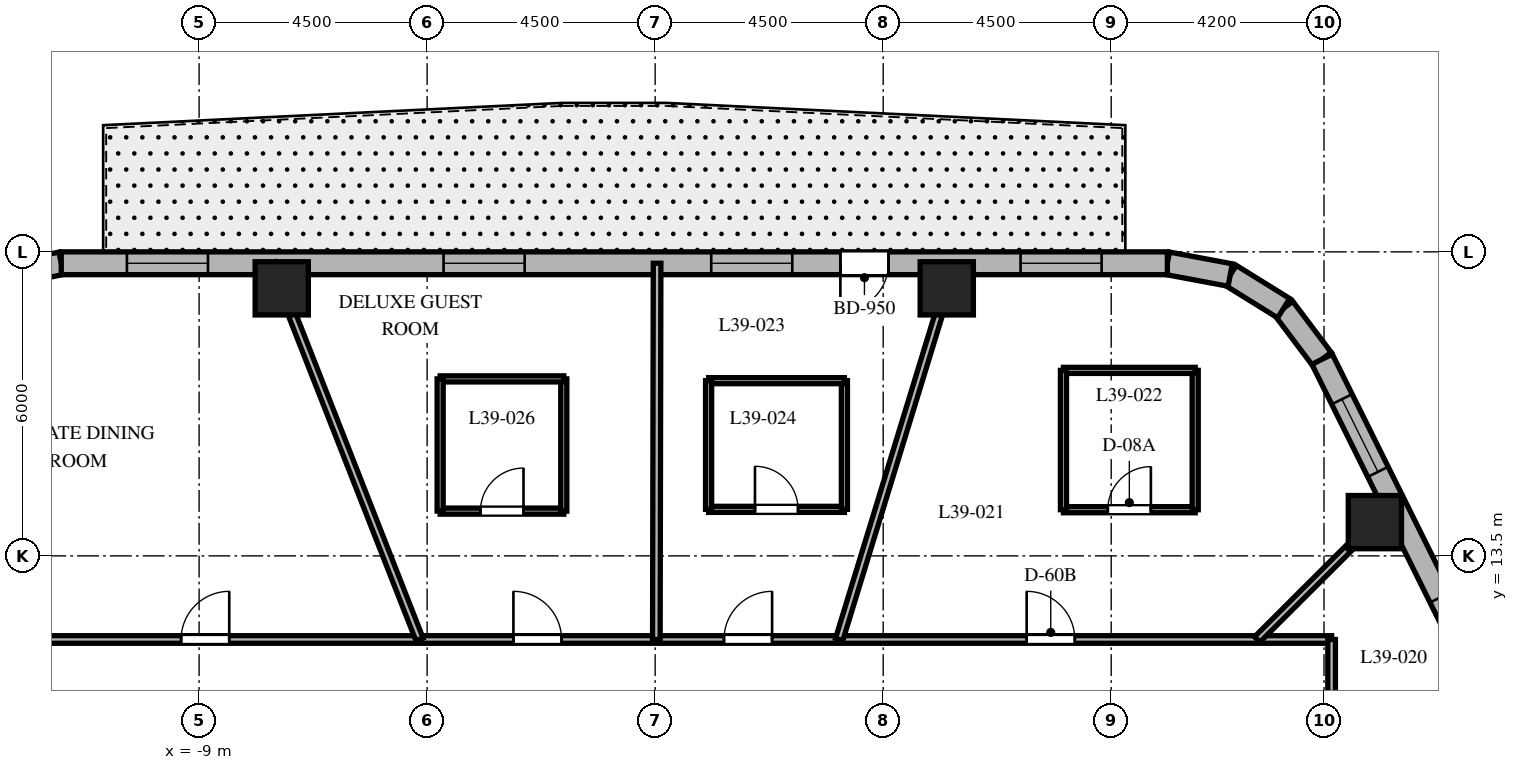
"""IFC4 building model, lengths in metres.
Left out: names, types, materials, properties, quantities, classifications, styles, units other than length and angle.
Written with IfcOpenShell. Run it as: python <this file> out.ifc"""

import sys

from ifc_helpers import new_model, si_unit, direction, frame, frame_2d, origin, origin_2d, place, context, subcontext, project, spatial, rectangle, extrude, element, fill, save


model = new_model("IFC4")
c1 = context("Model", 3, precision=1e-05, world=origin(), true_north=direction((0.0, 1.0)))
c2 = subcontext(c1, "Body", "Model", "MODEL_VIEW")
j1 = project(units=[si_unit("LENGTHUNIT", "METRE"), si_unit("PLANEANGLEUNIT", "RADIAN")], contexts=[c1])
p1 = place(None, origin())
s1 = spatial("IfcSite", under=j1, at=p1, CompositionType="ELEMENT")
p2 = place(p1, origin())
s2 = spatial("IfcBuilding", under=s1, at=p2, CompositionType="ELEMENT")
p3 = place(p2, frame((0.0, 0.0, 159.1)))
s3 = spatial("IfcBuildingStorey", under=s2, at=p3, CompositionType="ELEMENT", Elevation=159.1)
for number, where, z_axis, x_axis in (
    (1, (14.204, 14.166, 0.0), (0.0, 0.0, 1.0), (1.0, 0.0, 0.0)),
    (2, (5.755, 18.78, 0.0), (0.0, 0.0, 1.0), (1.0, 0.0, 0.0)),
    (3, (-7.369, 18.78, 0.0), (0.0, 0.0, 1.0), (1.0, 0.0, 0.0)),
):
    element("IfcColumn", number, at=place(p3, frame(where, z_axis=z_axis, x_axis=x_axis)), inside=s3, PredefinedType="COLUMN", context=c2, shape_type="SweptSolid", body=[
        extrude(rectangle(XDim=1.05, YDim=1.05, at=origin_2d()), origin(), (0.0, 0.0, 1.0), 3.7),
    ])
p4 = place(p3, frame((13.162, 17.381, 0.0), z_axis=(0.0, 0.0, 1.0), x_axis=(-0.601515770517, 0.798860925205, 0.0)))
e4 = element("IfcWall", 4, at=p4, inside=s3, PredefinedType="SOLIDWALL", context=c2, shape_type="SweptSolid", body=[
    extrude(rectangle(XDim=1.262, YDim=0.45, at=frame_2d((0.631, 0.0))), origin(), (0.0, 0.0, 1.0), 3.4),
])
p5 = place(p3, frame((12.403, 18.389, 0.0), z_axis=(0.0, 0.0, 1.0), x_axis=(-0.849795170926, 0.527113049991, 0.0)))
e5 = element("IfcWall", 5, at=p5, inside=s3, PredefinedType="SOLIDWALL", context=c2, shape_type="SweptSolid", body=[
    extrude(rectangle(XDim=1.241, YDim=0.45, at=frame_2d((0.62, 0.0))), origin(), (0.0, 0.0, 1.0), 3.4),
])
p6 = place(p3, frame((11.349, 19.043, 0.0), z_axis=(0.0, 0.0, 1.0), x_axis=(-0.982931267051, 0.183973161772, 0.0)))
e6 = element("IfcWall", 6, at=p6, inside=s3, PredefinedType="SOLIDWALL", context=c2, shape_type="SweptSolid", body=[
    extrude(rectangle(XDim=1.262, YDim=0.45, at=frame_2d((0.631, 0.0))), origin(), (0.0, 0.0, 1.0), 3.4),
])
p7 = place(p3, frame((-11.72, 19.275, 0.0), z_axis=(0.0, 0.0, 1.0), x_axis=(-0.97893106758, -0.204191001093, 0.0)))
e7 = element("IfcWall", 7, at=p7, inside=s3, PredefinedType="SOLIDWALL", context=c2, shape_type="SweptSolid", body=[
    extrude(rectangle(XDim=1.4, YDim=0.45, at=frame_2d((0.7, 0.0))), origin(), (0.0, 0.0, 1.0), 3.4),
])
p8 = place(p3, frame((20.618, 2.344, 0.0), z_axis=(0.0, 0.0, 1.0), x_axis=(-0.444243691097, 0.895905990002, 0.0)))
e8 = element("IfcWall", 8, at=p8, inside=s3, PredefinedType="SOLIDWALL", context=c2, shape_type="SweptSolid", body=[
    extrude(rectangle(XDim=16.784, YDim=0.45, at=frame_2d((8.392, 0.0))), origin(), (0.0, 0.0, 1.0), 3.4),
])
p9 = place(p8, frame((5.245, 0.0, 0.8)))
e9 = element("IfcOpeningElement", 9, at=p9, cuts=e8, PredefinedType="OPENING", context=c2, shape_type="SweptSolid", body=[
    extrude(rectangle(XDim=1.6, YDim=1.75, at=frame_2d((0.8, 0.875))), frame((0.0, 0.235, 0.0), z_axis=(0.0, -1.0, 0.0), x_axis=(1.0, 0.0, 0.0)), (0.0, 0.0, 1.0), 0.47),
])
p10 = place(p8, frame((9.936, 0.0, 0.8)))
e10 = element("IfcOpeningElement", 10, at=p10, cuts=e8, PredefinedType="OPENING", context=c2, shape_type="SweptSolid", body=[
    extrude(rectangle(XDim=1.6, YDim=1.75, at=frame_2d((0.8, 0.875))), frame((0.0, 0.235, 0.0), z_axis=(0.0, -1.0, 0.0), x_axis=(1.0, 0.0, 0.0)), (0.0, 0.0, 1.0), 0.47),
])
p11 = place(p8, frame((14.303, 0.0, 0.8)))
e11 = element("IfcOpeningElement", 11, at=p11, cuts=e8, PredefinedType="OPENING", context=c2, shape_type="SweptSolid", body=[
    extrude(rectangle(XDim=1.6, YDim=1.75, at=frame_2d((0.8, 0.875))), frame((0.0, 0.235, 0.0), z_axis=(0.0, -1.0, 0.0), x_axis=(1.0, 0.0, 0.0)), (0.0, 0.0, 1.0), 0.47),
])
p12 = place(p8, frame((0.931, 0.0, 0.8)))
e12 = element("IfcOpeningElement", 12, at=p12, cuts=e8, PredefinedType="OPENING", context=c2, shape_type="SweptSolid", body=[
    extrude(rectangle(XDim=1.6, YDim=1.75, at=frame_2d((0.8, 0.875))), frame((0.0, 0.235, 0.0), z_axis=(0.0, -1.0, 0.0), x_axis=(1.0, 0.0, 0.0)), (0.0, 0.0, 1.0), 0.47),
])
p13 = place(p3, frame((10.108, 19.275, 0.0), z_axis=(0.0, 0.0, 1.0), x_axis=(-1.0, 0.0, 0.0)))
e13 = element("IfcWall", 13, at=p13, inside=s3, PredefinedType="SOLIDWALL", context=c2, shape_type="SweptSolid", body=[
    extrude(rectangle(XDim=21.829, YDim=0.45, at=frame_2d((10.915, 0.0))), origin(), (0.0, 0.0, 1.0), 3.4),
])
p14 = place(p13, frame((5.503, 0.0, 0.0)))
e14 = element("IfcOpeningElement", 14, at=p14, cuts=e13, PredefinedType="OPENING", context=c2, shape_type="SweptSolid", body=[
    extrude(rectangle(XDim=0.95, YDim=2.15, at=frame_2d((0.475, 1.075))), frame((0.0, 0.235, 0.0), z_axis=(0.0, -1.0, 0.0), x_axis=(1.0, 0.0, 0.0)), (0.0, 0.0, 1.0), 0.47),
])
p15 = place(p13, frame((1.297, 0.0, 0.8)))
e15 = element("IfcOpeningElement", 15, at=p15, cuts=e13, PredefinedType="OPENING", context=c2, shape_type="SweptSolid", body=[
    extrude(rectangle(XDim=1.6, YDim=1.75, at=frame_2d((0.8, 0.875))), frame((0.0, 0.235, 0.0), z_axis=(0.0, -1.0, 0.0), x_axis=(1.0, 0.0, 0.0)), (0.0, 0.0, 1.0), 0.47),
])
p16 = place(p13, frame((7.402, 0.0, 0.8)))
e16 = element("IfcOpeningElement", 16, at=p16, cuts=e13, PredefinedType="OPENING", context=c2, shape_type="SweptSolid", body=[
    extrude(rectangle(XDim=1.6, YDim=1.75, at=frame_2d((0.8, 0.875))), frame((0.0, 0.235, 0.0), z_axis=(0.0, -1.0, 0.0), x_axis=(1.0, 0.0, 0.0)), (0.0, 0.0, 1.0), 0.47),
])
p17 = place(p13, frame((12.684, 0.0, 0.8)))
e17 = element("IfcOpeningElement", 17, at=p17, cuts=e13, PredefinedType="OPENING", context=c2, shape_type="SweptSolid", body=[
    extrude(rectangle(XDim=1.6, YDim=1.75, at=frame_2d((0.8, 0.875))), frame((0.0, 0.235, 0.0), z_axis=(0.0, -1.0, 0.0), x_axis=(1.0, 0.0, 0.0)), (0.0, 0.0, 1.0), 0.47),
])
p18 = place(p13, frame((18.933, 0.0, 0.8)))
e18 = element("IfcOpeningElement", 18, at=p18, cuts=e13, PredefinedType="OPENING", context=c2, shape_type="SweptSolid", body=[
    extrude(rectangle(XDim=1.6, YDim=1.75, at=frame_2d((0.8, 0.875))), frame((0.0, 0.235, 0.0), z_axis=(0.0, -1.0, 0.0), x_axis=(1.0, 0.0, 0.0)), (0.0, 0.0, 1.0), 0.47),
])
p19 = place(p3, frame((-13.35, 11.85, 0.0), z_axis=(0.0, 0.0, 1.0), x_axis=(1.0, 0.0, 0.0)))
e19 = element("IfcWall", 19, at=p19, inside=s3, PredefinedType="PARTITIONING", context=c2, shape_type="SweptSolid", body=[
    extrude(rectangle(XDim=26.7, YDim=0.15, at=frame_2d((13.35, 0.0))), origin(), (0.0, 0.0, 1.0), 2.84),
])
p20 = place(p19, frame((20.682, 0.0, 0.0)))
e20 = element("IfcOpeningElement", 20, at=p20, cuts=e19, PredefinedType="OPENING", context=c2, shape_type="SweptSolid", body=[
    extrude(rectangle(XDim=0.95, YDim=2.03, at=frame_2d((0.475, 1.015))), frame((0.0, 0.085, 0.0), z_axis=(0.0, -1.0, 0.0), x_axis=(1.0, 0.0, 0.0)), (0.0, 0.0, 1.0), 0.17),
])
p21 = place(p19, frame((14.708, 0.0, 0.0)))
e21 = element("IfcOpeningElement", 21, at=p21, cuts=e19, PredefinedType="OPENING", context=c2, shape_type="SweptSolid", body=[
    extrude(rectangle(XDim=0.95, YDim=2.03, at=frame_2d((0.475, 1.015))), frame((0.0, 0.085, 0.0), z_axis=(0.0, -1.0, 0.0), x_axis=(1.0, 0.0, 0.0)), (0.0, 0.0, 1.0), 0.17),
])
p22 = place(p19, frame((10.553, 0.0, 0.0)))
e22 = element("IfcOpeningElement", 22, at=p22, cuts=e19, PredefinedType="OPENING", context=c2, shape_type="SweptSolid", body=[
    extrude(rectangle(XDim=0.95, YDim=2.03, at=frame_2d((0.475, 1.015))), frame((0.0, 0.085, 0.0), z_axis=(0.0, -1.0, 0.0), x_axis=(1.0, 0.0, 0.0)), (0.0, 0.0, 1.0), 0.17),
])
p23 = place(p19, frame((3.995, 0.0, 0.0)))
e23 = element("IfcOpeningElement", 23, at=p23, cuts=e19, PredefinedType="OPENING", context=c2, shape_type="SweptSolid", body=[
    extrude(rectangle(XDim=0.95, YDim=2.03, at=frame_2d((0.475, 1.015))), frame((0.0, 0.085, 0.0), z_axis=(0.0, -1.0, 0.0), x_axis=(1.0, 0.0, 0.0)), (0.0, 0.0, 1.0), 0.17),
])
p24 = place(p3, frame((13.35, 11.85, 0.0), z_axis=(0.0, 0.0, 1.0), x_axis=(0.0, -1.0, 0.0)))
e24 = element("IfcWall", 24, at=p24, inside=s3, PredefinedType="PARTITIONING", context=c2, shape_type="SweptSolid", body=[
    extrude(rectangle(XDim=23.7, YDim=0.15, at=frame_2d((11.85, 0.0))), origin(), (0.0, 0.0, 1.0), 2.84),
])
p25 = place(p24, frame((5.652, 0.0, 0.0)))
e25 = element("IfcOpeningElement", 25, at=p25, cuts=e24, PredefinedType="OPENING", context=c2, shape_type="SweptSolid", body=[
    extrude(rectangle(XDim=0.95, YDim=2.03, at=frame_2d((0.475, 1.015))), frame((0.0, 0.085, 0.0), z_axis=(0.0, -1.0, 0.0), x_axis=(1.0, 0.0, 0.0)), (0.0, 0.0, 1.0), 0.17),
])
p26 = place(p24, frame((1.721, 0.0, 0.0)))
e26 = element("IfcOpeningElement", 26, at=p26, cuts=e24, PredefinedType="OPENING", context=c2, shape_type="SweptSolid", body=[
    extrude(rectangle(XDim=0.9, YDim=2.03, at=frame_2d((0.45, 1.015))), frame((0.0, 0.085, 0.0), z_axis=(0.0, -1.0, 0.0), x_axis=(1.0, 0.0, 0.0)), (0.0, 0.0, 1.0), 0.17),
])
p27 = place(p24, frame((18.389, 0.0, 0.0)))
e27 = element("IfcOpeningElement", 27, at=p27, cuts=e24, PredefinedType="OPENING", context=c2, shape_type="SweptSolid", body=[
    extrude(rectangle(XDim=0.95, YDim=2.03, at=frame_2d((0.475, 1.015))), frame((0.0, 0.085, 0.0), z_axis=(0.0, -1.0, 0.0), x_axis=(1.0, 0.0, 0.0)), (0.0, 0.0, 1.0), 0.17),
])
p28 = place(p24, frame((10.751, 0.0, 0.0)))
e28 = element("IfcOpeningElement", 28, at=p28, cuts=e24, PredefinedType="OPENING", context=c2, shape_type="SweptSolid", body=[
    extrude(rectangle(XDim=0.95, YDim=2.03, at=frame_2d((0.475, 1.015))), frame((0.0, 0.085, 0.0), z_axis=(0.0, -1.0, 0.0), x_axis=(1.0, 0.0, 0.0)), (0.0, 0.0, 1.0), 0.17),
])
p29 = place(p3, frame((11.882, 11.85, 0.0), z_axis=(0.0, 0.0, 1.0), x_axis=(0.708037373639, 0.706174962407, 0.0)))
e29 = element("IfcWall", 29, at=p29, inside=s3, PredefinedType="PARTITIONING", context=c2, shape_type="SweptSolid", body=[
    extrude(rectangle(XDim=3.802, YDim=0.15, at=frame_2d((1.901, 0.0))), origin(), (0.0, 0.0, 1.0), 2.64),
])
p30 = place(p3, frame((3.631, 11.85, 0.0), z_axis=(0.0, 0.0, 1.0), x_axis=(0.293007573338, 0.956110120209, 0.0)))
e30 = element("IfcWall", 30, at=p30, inside=s3, PredefinedType="PARTITIONING", context=c2, shape_type="SweptSolid", body=[
    extrude(rectangle(XDim=7.766, YDim=0.15, at=frame_2d((3.883, 0.0))), origin(), (0.0, 0.0, 1.0), 2.64),
])
p31 = place(p3, frame((0.024, 11.85, 0.0), z_axis=(0.0, 0.0, 1.0), x_axis=(0.001972901592, 0.999998053828, 0.0)))
e31 = element("IfcWall", 31, at=p31, inside=s3, PredefinedType="PARTITIONING", context=c2, shape_type="SweptSolid", body=[
    extrude(rectangle(XDim=7.425, YDim=0.15, at=frame_2d((3.712, 0.0))), origin(), (0.0, 0.0, 1.0), 2.64),
])
p32 = place(p3, frame((-4.65, 11.85, 0.0), z_axis=(0.0, 0.0, 1.0), x_axis=(-0.365265947993, 0.930903210456, 0.0)))
e32 = element("IfcWall", 32, at=p32, inside=s3, PredefinedType="PARTITIONING", context=c2, shape_type="SweptSolid", body=[
    extrude(rectangle(XDim=7.976, YDim=0.15, at=frame_2d((3.988, 0.0))), origin(), (0.0, 0.0, 1.0), 2.64),
])
p33 = place(p3, frame((8.058, 14.411, 0.0), z_axis=(0.0, 0.0, 1.0), x_axis=(1.0, 0.0, 0.0)))
e33 = element("IfcWall", 33, at=p33, inside=s3, PredefinedType="PARTITIONING", context=c2, shape_type="SweptSolid", body=[
    extrude(rectangle(XDim=2.6, YDim=0.12, at=frame_2d((1.3, 0.0))), origin(), (0.0, 0.0, 1.0), 3.4),
])
p34 = place(p33, frame((0.875, 0.0, 0.0)))
e34 = element("IfcOpeningElement", 34, at=p34, cuts=e33, PredefinedType="OPENING", context=c2, shape_type="SweptSolid", body=[
    extrude(rectangle(XDim=0.85, YDim=2.03, at=frame_2d((0.425, 1.015))), frame((0.0, 0.07, 0.0), z_axis=(0.0, -1.0, 0.0), x_axis=(1.0, 0.0, 0.0)), (0.0, 0.0, 1.0), 0.14),
])
p35 = place(p3, frame((10.658, 14.411, 0.0), z_axis=(0.0, 0.0, 1.0), x_axis=(0.0, 1.0, 0.0)))
e35 = element("IfcWall", 35, at=p35, inside=s3, PredefinedType="PARTITIONING", context=c2, shape_type="SweptSolid", body=[
    extrude(rectangle(XDim=2.75, YDim=0.12, at=frame_2d((1.375, 0.0))), origin(), (0.0, 0.0, 1.0), 2.64),
])
p36 = place(p3, frame((10.658, 17.161, 0.0), z_axis=(0.0, 0.0, 1.0), x_axis=(-1.0, 0.0, 0.0)))
e36 = element("IfcWall", 36, at=p36, inside=s3, PredefinedType="PARTITIONING", context=c2, shape_type="SweptSolid", body=[
    extrude(rectangle(XDim=2.6, YDim=0.12, at=frame_2d((1.3, 0.0))), origin(), (0.0, 0.0, 1.0), 2.64),
])
p37 = place(p3, frame((8.058, 17.161, 0.0), z_axis=(0.0, 0.0, 1.0), x_axis=(0.0, -1.0, 0.0)))
e37 = element("IfcWall", 37, at=p37, inside=s3, PredefinedType="PARTITIONING", context=c2, shape_type="SweptSolid", body=[
    extrude(rectangle(XDim=2.75, YDim=0.12, at=frame_2d((1.375, 0.0))), origin(), (0.0, 0.0, 1.0), 3.4),
])
p38 = place(p3, frame((1.055, 14.418, 0.0), z_axis=(0.0, 0.0, 1.0), x_axis=(1.0, 0.0, 0.0)))
e38 = element("IfcWall", 38, at=p38, inside=s3, PredefinedType="PARTITIONING", context=c2, shape_type="SweptSolid", body=[
    extrude(rectangle(XDim=2.68, YDim=0.12, at=frame_2d((1.34, 0.0))), origin(), (0.0, 0.0, 1.0), 3.4),
])
p39 = place(p38, frame((0.915, 0.0, 0.0)))
e39 = element("IfcOpeningElement", 39, at=p39, cuts=e38, PredefinedType="OPENING", context=c2, shape_type="SweptSolid", body=[
    extrude(rectangle(XDim=0.85, YDim=2.03, at=frame_2d((0.425, 1.015))), frame((0.0, 0.07, 0.0), z_axis=(0.0, -1.0, 0.0), x_axis=(1.0, 0.0, 0.0)), (0.0, 0.0, 1.0), 0.14),
])
p40 = place(p3, frame((3.735, 14.418, 0.0), z_axis=(0.0, 0.0, 1.0), x_axis=(0.0, 1.0, 0.0)))
e40 = element("IfcWall", 40, at=p40, inside=s3, PredefinedType="PARTITIONING", context=c2, shape_type="SweptSolid", body=[
    extrude(rectangle(XDim=2.54, YDim=0.12, at=frame_2d((1.27, 0.0))), origin(), (0.0, 0.0, 1.0), 2.84),
])
p41 = place(p3, frame((3.735, 16.958, 0.0), z_axis=(0.0, 0.0, 1.0), x_axis=(-1.0, 0.0, 0.0)))
e41 = element("IfcWall", 41, at=p41, inside=s3, PredefinedType="PARTITIONING", context=c2, shape_type="SweptSolid", body=[
    extrude(rectangle(XDim=2.68, YDim=0.12, at=frame_2d((1.34, 0.0))), origin(), (0.0, 0.0, 1.0), 3.4),
])
p42 = place(p3, frame((1.055, 16.958, 0.0), z_axis=(0.0, 0.0, 1.0), x_axis=(0.0, -1.0, 0.0)))
e42 = element("IfcWall", 42, at=p42, inside=s3, PredefinedType="PARTITIONING", context=c2, shape_type="SweptSolid", body=[
    extrude(rectangle(XDim=2.54, YDim=0.12, at=frame_2d((1.27, 0.0))), origin(), (0.0, 0.0, 1.0), 2.84),
])
p43 = place(p3, frame((-4.243, 14.383, 0.0), z_axis=(0.0, 0.0, 1.0), x_axis=(1.0, 0.0, 0.0)))
e43 = element("IfcWall", 43, at=p43, inside=s3, PredefinedType="PARTITIONING", context=c2, shape_type="SweptSolid", body=[
    extrude(rectangle(XDim=2.44, YDim=0.12, at=frame_2d((1.22, 0.0))), origin(), (0.0, 0.0, 1.0), 3.4),
])
p44 = place(p43, frame((0.795, 0.0, 0.0)))
e44 = element("IfcOpeningElement", 44, at=p44, cuts=e43, PredefinedType="OPENING", context=c2, shape_type="SweptSolid", body=[
    extrude(rectangle(XDim=0.85, YDim=2.03, at=frame_2d((0.425, 1.015))), frame((0.0, 0.07, 0.0), z_axis=(0.0, -1.0, 0.0), x_axis=(1.0, 0.0, 0.0)), (0.0, 0.0, 1.0), 0.14),
])
p45 = place(p3, frame((-1.803, 14.383, 0.0), z_axis=(0.0, 0.0, 1.0), x_axis=(0.0, 1.0, 0.0)))
e45 = element("IfcWall", 45, at=p45, inside=s3, PredefinedType="PARTITIONING", context=c2, shape_type="SweptSolid", body=[
    extrude(rectangle(XDim=2.61, YDim=0.12, at=frame_2d((1.305, 0.0))), origin(), (0.0, 0.0, 1.0), 2.84),
])
p46 = place(p3, frame((-1.803, 16.993, 0.0), z_axis=(0.0, 0.0, 1.0), x_axis=(-1.0, 0.0, 0.0)))
e46 = element("IfcWall", 46, at=p46, inside=s3, PredefinedType="PARTITIONING", context=c2, shape_type="SweptSolid", body=[
    extrude(rectangle(XDim=2.44, YDim=0.12, at=frame_2d((1.22, 0.0))), origin(), (0.0, 0.0, 1.0), 3.4),
])
p47 = place(p3, frame((-4.243, 16.993, 0.0), z_axis=(0.0, 0.0, 1.0), x_axis=(0.0, -1.0, 0.0)))
e47 = element("IfcWall", 47, at=p47, inside=s3, PredefinedType="PARTITIONING", context=c2, shape_type="SweptSolid", body=[
    extrude(rectangle(XDim=2.61, YDim=0.12, at=frame_2d((1.305, 0.0))), origin(), (0.0, 0.0, 1.0), 2.84),
])
p48 = place(p10, origin())
e48 = element("IfcWindow", 48, at=p48, inside=s3, PartitioningType="SINGLE_PANEL", PredefinedType="WINDOW", context=c2, shape_type="SweptSolid", body=[
    extrude(rectangle(XDim=1.6, YDim=1.75, at=frame_2d((0.8, 0.875))), frame((0.0, 0.03, 0.0), z_axis=(0.0, -1.0, 0.0), x_axis=(1.0, 0.0, 0.0)), (0.0, 0.0, 1.0), 0.06),
])
fill(e10, e48)
p49 = place(p11, origin())
e49 = element("IfcWindow", 49, at=p49, inside=s3, PartitioningType="SINGLE_PANEL", PredefinedType="WINDOW", context=c2, shape_type="SweptSolid", body=[
    extrude(rectangle(XDim=1.6, YDim=1.75, at=frame_2d((0.8, 0.875))), frame((0.0, 0.03, 0.0), z_axis=(0.0, -1.0, 0.0), x_axis=(1.0, 0.0, 0.0)), (0.0, 0.0, 1.0), 0.06),
])
fill(e11, e49)
p50 = place(p14, origin())
e50 = element("IfcDoor", 50, at=p50, inside=s3, OperationType="SINGLE_SWING_RIGHT", PredefinedType="DOOR", context=c2, shape_type="SweptSolid", body=[
    extrude(rectangle(XDim=0.95, YDim=2.15, at=frame_2d((0.475, 1.075))), frame((0.0, 0.025, 0.0), z_axis=(0.0, -1.0, 0.0), x_axis=(1.0, 0.0, 0.0)), (0.0, 0.0, 1.0), 0.05),
])
fill(e14, e50)
p51 = place(p15, origin())
e51 = element("IfcWindow", 51, at=p51, inside=s3, PartitioningType="SINGLE_PANEL", PredefinedType="WINDOW", context=c2, shape_type="SweptSolid", body=[
    extrude(rectangle(XDim=1.6, YDim=1.75, at=frame_2d((0.8, 0.875))), frame((0.0, 0.03, 0.0), z_axis=(0.0, -1.0, 0.0), x_axis=(1.0, 0.0, 0.0)), (0.0, 0.0, 1.0), 0.06),
])
fill(e15, e51)
p52 = place(p16, origin())
e52 = element("IfcWindow", 52, at=p52, inside=s3, PartitioningType="SINGLE_PANEL", PredefinedType="WINDOW", context=c2, shape_type="SweptSolid", body=[
    extrude(rectangle(XDim=1.6, YDim=1.75, at=frame_2d((0.8, 0.875))), frame((0.0, 0.03, 0.0), z_axis=(0.0, -1.0, 0.0), x_axis=(1.0, 0.0, 0.0)), (0.0, 0.0, 1.0), 0.06),
])
fill(e16, e52)
p53 = place(p17, origin())
e53 = element("IfcWindow", 53, at=p53, inside=s3, PartitioningType="SINGLE_PANEL", PredefinedType="WINDOW", context=c2, shape_type="SweptSolid", body=[
    extrude(rectangle(XDim=1.6, YDim=1.75, at=frame_2d((0.8, 0.875))), frame((0.0, 0.03, 0.0), z_axis=(0.0, -1.0, 0.0), x_axis=(1.0, 0.0, 0.0)), (0.0, 0.0, 1.0), 0.06),
])
fill(e17, e53)
p54 = place(p18, origin())
e54 = element("IfcWindow", 54, at=p54, inside=s3, PartitioningType="SINGLE_PANEL", PredefinedType="WINDOW", context=c2, shape_type="SweptSolid", body=[
    extrude(rectangle(XDim=1.6, YDim=1.75, at=frame_2d((0.8, 0.875))), frame((0.0, 0.03, 0.0), z_axis=(0.0, -1.0, 0.0), x_axis=(1.0, 0.0, 0.0)), (0.0, 0.0, 1.0), 0.06),
])
fill(e18, e54)
p55 = place(p20, origin())
e55 = element("IfcDoor", 55, at=p55, inside=s3, OperationType="SINGLE_SWING_LEFT", PredefinedType="DOOR", context=c2, shape_type="SweptSolid", body=[
    extrude(rectangle(XDim=0.95, YDim=2.03, at=frame_2d((0.475, 1.015))), frame((0.0, 0.025, 0.0), z_axis=(0.0, -1.0, 0.0), x_axis=(1.0, 0.0, 0.0)), (0.0, 0.0, 1.0), 0.05),
])
fill(e20, e55)
p56 = place(p34, origin())
e56 = element("IfcDoor", 56, at=p56, inside=s3, OperationType="SINGLE_SWING_RIGHT", PredefinedType="DOOR", context=c2, shape_type="SweptSolid", body=[
    extrude(rectangle(XDim=0.85, YDim=2.03, at=frame_2d((0.425, 1.015))), frame((0.0, 0.025, 0.0), z_axis=(0.0, -1.0, 0.0), x_axis=(1.0, 0.0, 0.0)), (0.0, 0.0, 1.0), 0.05),
])
fill(e34, e56)
p57 = place(p21, origin())
e57 = element("IfcDoor", 57, at=p57, inside=s3, OperationType="SINGLE_SWING_RIGHT", PredefinedType="DOOR", context=c2, shape_type="SweptSolid", body=[
    extrude(rectangle(XDim=0.95, YDim=2.03, at=frame_2d((0.475, 1.015))), frame((0.0, 0.025, 0.0), z_axis=(0.0, -1.0, 0.0), x_axis=(1.0, 0.0, 0.0)), (0.0, 0.0, 1.0), 0.05),
])
fill(e21, e57)
p58 = place(p39, origin())
e58 = element("IfcDoor", 58, at=p58, inside=s3, OperationType="SINGLE_SWING_LEFT", PredefinedType="DOOR", context=c2, shape_type="SweptSolid", body=[
    extrude(rectangle(XDim=0.85, YDim=2.03, at=frame_2d((0.425, 1.015))), frame((0.0, 0.025, 0.0), z_axis=(0.0, -1.0, 0.0), x_axis=(1.0, 0.0, 0.0)), (0.0, 0.0, 1.0), 0.05),
])
fill(e39, e58)
p59 = place(p22, origin())
e59 = element("IfcDoor", 59, at=p59, inside=s3, OperationType="SINGLE_SWING_LEFT", PredefinedType="DOOR", context=c2, shape_type="SweptSolid", body=[
    extrude(rectangle(XDim=0.95, YDim=2.03, at=frame_2d((0.475, 1.015))), frame((0.0, 0.025, 0.0), z_axis=(0.0, -1.0, 0.0), x_axis=(1.0, 0.0, 0.0)), (0.0, 0.0, 1.0), 0.05),
])
fill(e22, e59)
p60 = place(p44, origin())
e60 = element("IfcDoor", 60, at=p60, inside=s3, OperationType="SINGLE_SWING_RIGHT", PredefinedType="DOOR", context=c2, shape_type="SweptSolid", body=[
    extrude(rectangle(XDim=0.85, YDim=2.03, at=frame_2d((0.425, 1.015))), frame((0.0, 0.025, 0.0), z_axis=(0.0, -1.0, 0.0), x_axis=(1.0, 0.0, 0.0)), (0.0, 0.0, 1.0), 0.05),
])
fill(e44, e60)
p61 = place(p23, origin())
e61 = element("IfcDoor", 61, at=p61, inside=s3, OperationType="SINGLE_SWING_RIGHT", PredefinedType="DOOR", context=c2, shape_type="SweptSolid", body=[
    extrude(rectangle(XDim=0.95, YDim=2.03, at=frame_2d((0.475, 1.015))), frame((0.0, 0.025, 0.0), z_axis=(0.0, -1.0, 0.0), x_axis=(1.0, 0.0, 0.0)), (0.0, 0.0, 1.0), 0.05),
])
fill(e23, e61)
save(model, sys.argv[1])
